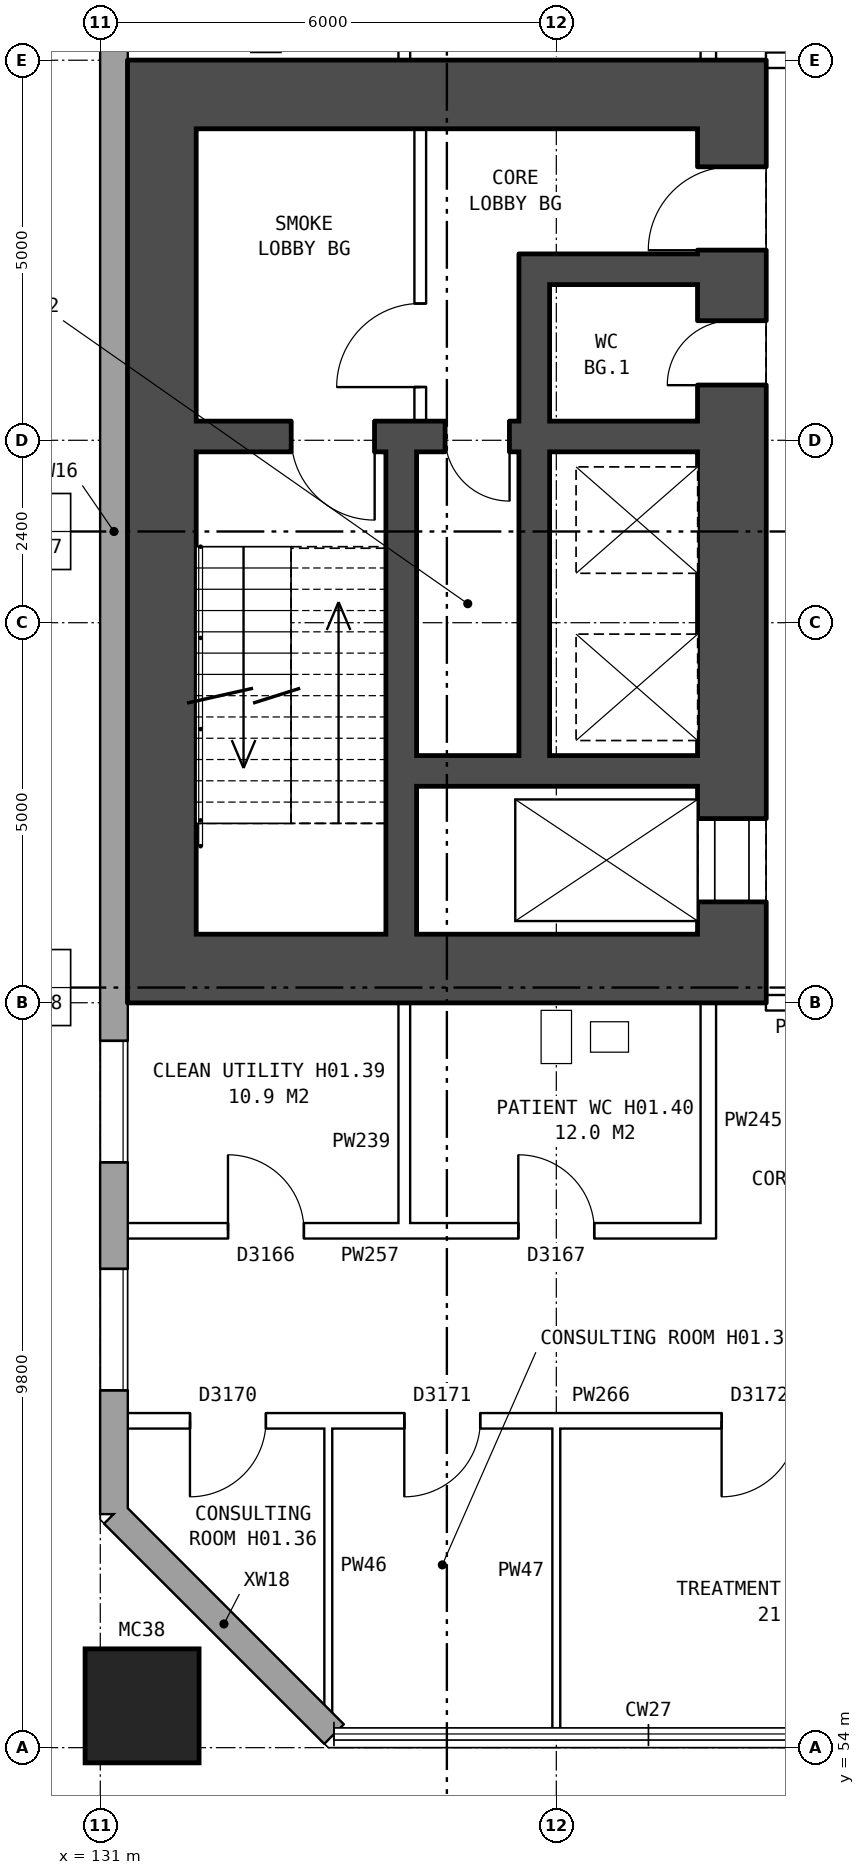
"""IFC4 building model, lengths in metres.
Left out: names, types, materials, properties, quantities, classifications, styles, units other than length and angle.
Written with IfcOpenShell. Run it as: python <this file> out.ifc"""

import sys

from ifc_helpers import new_model, si_unit, direction, frame, frame_2d, origin, origin_2d, place, context, subcontext, project, spatial, rectangle, hollow_rectangle, extrude, element, fill, save


model = new_model("IFC4")
c1 = context("Model", 3, precision=1e-05, world=origin(), true_north=direction((0.0, 1.0)))
c2 = subcontext(c1, "Body", "Model", "MODEL_VIEW")
j1 = project(units=[si_unit("LENGTHUNIT", "METRE"), si_unit("PLANEANGLEUNIT", "RADIAN")], contexts=[c1])
p1 = place(None, origin())
s1 = spatial("IfcSite", under=j1, at=p1, CompositionType="ELEMENT")
p2 = place(p1, origin())
s2 = spatial("IfcBuilding", under=s1, at=p2, CompositionType="ELEMENT")
p3 = place(p2, frame((0.0, 0.0, 5.5)))
s3 = spatial("IfcBuildingStorey", under=s2, at=p3, CompositionType="ELEMENT", Elevation=5.5)
p4 = place(p3, frame((131.55, 54.55, 0.0), z_axis=(0.0, 0.0, 1.0), x_axis=(1.0, 0.0, 0.0)))
e1 = element("IfcColumn", 1, at=p4, inside=s3, PredefinedType="COLUMN", context=c2, shape_type="SweptSolid", body=[
    extrude(hollow_rectangle(XDim=1.5, YDim=1.5, WallThickness=0.08, at=origin_2d()), origin(), (0.0, 0.0, 1.0), 4.6),
])
p5 = place(p3, frame((131.18, 57.075, 0.0), z_axis=(0.0, 0.0, 1.0), x_axis=(0.707106781187, -0.707106781187, 0.0)))
e2 = element("IfcWall", 2, at=p5, inside=s3, PredefinedType="STANDARD", context=c2, shape_type="SweptSolid", body=[
    extrude(rectangle(XDim=4.094, YDim=0.36, at=frame_2d((2.047, 0.0))), origin(), (0.0, 0.0, 1.0), 4.3),
])
p6 = place(p3, frame((131.18, 82.925, 0.0), z_axis=(0.0, 0.0, 1.0), x_axis=(0.0, -1.0, 0.0)))
e3 = element("IfcWall", 3, at=p6, inside=s3, PredefinedType="STANDARD", context=c2, shape_type="SweptSolid", body=[
    extrude(rectangle(XDim=25.851, YDim=0.36, at=frame_2d((12.925, 0.0))), origin(), (0.0, 0.0, 1.0), 4.3),
])
p7 = place(p6, frame((1.625, 0.0, 0.8)))
e4 = element("IfcOpeningElement", 4, at=p7, cuts=e3, PredefinedType="OPENING", context=c2, shape_type="SweptSolid", body=[
    extrude(rectangle(XDim=1.6, YDim=1.8, at=frame_2d((0.8, 0.9))), frame((0.0, 0.19, 0.0), z_axis=(0.0, -1.0, 0.0), x_axis=(1.0, 0.0, 0.0)), (0.0, 0.0, 1.0), 0.38),
])
p8 = place(p6, frame((4.625, 0.0, 0.8)))
e5 = element("IfcOpeningElement", 5, at=p8, cuts=e3, PredefinedType="OPENING", context=c2, shape_type="SweptSolid", body=[
    extrude(rectangle(XDim=1.6, YDim=1.8, at=frame_2d((0.8, 0.9))), frame((0.0, 0.19, 0.0), z_axis=(0.0, -1.0, 0.0), x_axis=(1.0, 0.0, 0.0)), (0.0, 0.0, 1.0), 0.38),
])
p9 = place(p6, frame((19.625, 0.0, 0.8)))
e6 = element("IfcOpeningElement", 6, at=p9, cuts=e3, PredefinedType="OPENING", context=c2, shape_type="SweptSolid", body=[
    extrude(rectangle(XDim=1.6, YDim=1.8, at=frame_2d((0.8, 0.9))), frame((0.0, 0.19, 0.0), z_axis=(0.0, -1.0, 0.0), x_axis=(1.0, 0.0, 0.0)), (0.0, 0.0, 1.0), 0.38),
])
p10 = place(p6, frame((22.625, 0.0, 0.8)))
e7 = element("IfcOpeningElement", 7, at=p10, cuts=e3, PredefinedType="OPENING", context=c2, shape_type="SweptSolid", body=[
    extrude(rectangle(XDim=1.6, YDim=1.8, at=frame_2d((0.8, 0.9))), frame((0.0, 0.19, 0.0), z_axis=(0.0, -1.0, 0.0), x_axis=(1.0, 0.0, 0.0)), (0.0, 0.0, 1.0), 0.38),
])
p11 = place(p3, frame((139.31, 64.7, 0.0), z_axis=(0.0, 0.0, 1.0), x_axis=(0.0, 1.0, 0.0)))
e8 = element("IfcWall", 8, at=p11, inside=s3, PredefinedType="SHEAR", context=c2, shape_type="SweptSolid", body=[
    extrude(rectangle(XDim=10.6, YDim=0.9, at=frame_2d((5.3, 0.0))), origin(), (0.0, 0.0, 1.0), 4.3),
])
p12 = place(p11, frame((0.425, 0.0, 0.0)))
e9 = element("IfcOpeningElement", 9, at=p12, cuts=e8, PredefinedType="OPENING", context=c2, shape_type="SweptSolid", body=[
    extrude(rectangle(XDim=1.1, YDim=2.1, at=frame_2d((0.55, 1.05))), frame((0.0, 0.46, 0.0), z_axis=(0.0, -1.0, 0.0), x_axis=(1.0, 0.0, 0.0)), (0.0, 0.0, 1.0), 0.92),
])
p13 = place(p11, frame((9.0, 0.0, 0.0)))
e10 = element("IfcOpeningElement", 10, at=p13, cuts=e8, PredefinedType="OPENING", context=c2, shape_type="SweptSolid", body=[
    extrude(rectangle(XDim=1.1, YDim=2.1, at=frame_2d((0.55, 1.05))), frame((0.0, 0.46, 0.0), z_axis=(0.0, -1.0, 0.0), x_axis=(1.0, 0.0, 0.0)), (0.0, 0.0, 1.0), 0.92),
])
p14 = place(p11, frame((7.225, 0.0, 0.0)))
e11 = element("IfcOpeningElement", 11, at=p14, cuts=e8, PredefinedType="OPENING", context=c2, shape_type="SweptSolid", body=[
    extrude(rectangle(XDim=0.85, YDim=2.1, at=frame_2d((0.425, 1.05))), frame((0.0, 0.46, 0.0), z_axis=(0.0, -1.0, 0.0), x_axis=(1.0, 0.0, 0.0)), (0.0, 0.0, 1.0), 0.92),
])
p15 = place(p3, frame((131.81, 64.7, 0.0), z_axis=(0.0, 0.0, 1.0), x_axis=(0.0, 1.0, 0.0)))
e12 = element("IfcWall", 12, at=p15, inside=s3, PredefinedType="SHEAR", context=c2, shape_type="SweptSolid", body=[
    extrude(rectangle(XDim=10.6, YDim=0.9, at=frame_2d((5.3, 0.0))), origin(), (0.0, 0.0, 1.0), 4.3),
])
for number, where, z_axis, x_axis in (
    (13, (139.76, 64.25, 0.0), (0.0, 0.0, 1.0), (-1.0, 0.0, 0.0)),
    (14, (139.76, 75.75, 0.0), (0.0, 0.0, 1.0), (-1.0, 0.0, 0.0)),
):
    element("IfcWall", number, at=place(p3, frame(where, z_axis=z_axis, x_axis=x_axis)), inside=s3, PredefinedType="SHEAR", context=c2, shape_type="SweptSolid", body=[
        extrude(rectangle(XDim=8.4, YDim=0.9, at=frame_2d((4.2, 0.0))), origin(), (0.0, 0.0, 1.0), 4.3),
    ])
p16 = place(p3, frame((138.86, 66.85, 0.0), z_axis=(0.0, 0.0, 1.0), x_axis=(-1.0, 0.0, 0.0)))
e15 = element("IfcWall", 15, at=p16, inside=s3, PredefinedType="SHEAR", context=c2, shape_type="SweptSolid", body=[
    extrude(rectangle(XDim=3.7, YDim=0.4, at=frame_2d((1.85, 0.0))), origin(), (0.0, 0.0, 1.0), 4.3),
])
p17 = place(p3, frame((138.86, 71.25, 0.0), z_axis=(0.0, 0.0, 1.0), x_axis=(-1.0, 0.0, 0.0)))
e16 = element("IfcWall", 16, at=p17, inside=s3, PredefinedType="SHEAR", context=c2, shape_type="SweptSolid", body=[
    extrude(rectangle(XDim=6.6, YDim=0.4, at=frame_2d((3.3, 0.0))), origin(), (0.0, 0.0, 1.0), 4.3),
])
p18 = place(p17, frame((4.25, 0.0, 0.0)))
e17 = element("IfcOpeningElement", 17, at=p18, cuts=e16, PredefinedType="OPENING", context=c2, shape_type="SweptSolid", body=[
    extrude(rectangle(XDim=1.1, YDim=2.1, at=frame_2d((0.55, 1.05))), frame((0.0, 0.21, 0.0), z_axis=(0.0, -1.0, 0.0), x_axis=(1.0, 0.0, 0.0)), (0.0, 0.0, 1.0), 0.42),
])
p19 = place(p17, frame((2.475, 0.0, 0.0)))
e18 = element("IfcOpeningElement", 18, at=p19, cuts=e16, PredefinedType="OPENING", context=c2, shape_type="SweptSolid", body=[
    extrude(rectangle(XDim=0.85, YDim=2.1, at=frame_2d((0.425, 1.05))), frame((0.0, 0.21, 0.0), z_axis=(0.0, -1.0, 0.0), x_axis=(1.0, 0.0, 0.0)), (0.0, 0.0, 1.0), 0.42),
])
p20 = place(p3, frame((138.86, 73.45, 0.0), z_axis=(0.0, 0.0, 1.0), x_axis=(-1.0, 0.0, 0.0)))
e19 = element("IfcWall", 19, at=p20, inside=s3, PredefinedType="SHEAR", context=c2, shape_type="SweptSolid", body=[
    extrude(rectangle(XDim=1.95, YDim=0.4, at=frame_2d((0.975, 0.0))), origin(), (0.0, 0.0, 1.0), 4.3),
])
p21 = place(p3, frame((136.71, 67.05, 0.0), z_axis=(0.0, 0.0, 1.0), x_axis=(0.0, 1.0, 0.0)))
e20 = element("IfcWall", 20, at=p21, inside=s3, PredefinedType="SHEAR", context=c2, shape_type="SweptSolid", body=[
    extrude(rectangle(XDim=4.0, YDim=0.4, at=frame_2d((2.0, 0.0))), origin(), (0.0, 0.0, 1.0), 4.3),
])
p22 = place(p3, frame((136.71, 71.45, 0.0), z_axis=(0.0, 0.0, 1.0), x_axis=(0.0, 1.0, 0.0)))
e21 = element("IfcWall", 21, at=p22, inside=s3, PredefinedType="SHEAR", context=c2, shape_type="SweptSolid", body=[
    extrude(rectangle(XDim=2.2, YDim=0.4, at=frame_2d((1.1, 0.0))), origin(), (0.0, 0.0, 1.0), 4.3),
])
p23 = place(p3, frame((135.21, 71.45, 0.0), z_axis=(0.0, 0.0, 1.0), x_axis=(0.0, 1.0, 0.0)))
e22 = element("IfcWall", 22, at=p23, inside=s3, PredefinedType="PARTITIONING", context=c2, shape_type="SweptSolid", body=[
    extrude(rectangle(XDim=3.85, YDim=0.15, at=frame_2d((1.925, 0.0))), origin(), (0.0, 0.0, 1.0), 4.3),
])
p24 = place(p23, frame((0.45, 0.0, 0.0)))
e23 = element("IfcOpeningElement", 23, at=p24, cuts=e22, PredefinedType="OPENING", context=c2, shape_type="SweptSolid", body=[
    extrude(rectangle(XDim=1.1, YDim=2.1, at=frame_2d((0.55, 1.05))), frame((0.0, 0.085, 0.0), z_axis=(0.0, -1.0, 0.0), x_axis=(1.0, 0.0, 0.0)), (0.0, 0.0, 1.0), 0.17),
])
p25 = place(p3, frame((134.96, 64.7, 0.0), z_axis=(0.0, 0.0, 1.0), x_axis=(0.0, 1.0, 0.0)))
e24 = element("IfcWall", 24, at=p25, inside=s3, PredefinedType="SHEAR", context=c2, shape_type="SweptSolid", body=[
    extrude(rectangle(XDim=6.35, YDim=0.4, at=frame_2d((3.175, 0.0))), origin(), (0.0, 0.0, 1.0), 4.3),
])
p26 = place(p3, frame((131.24, 58.3, 0.0), z_axis=(0.0, 0.0, 1.0), x_axis=(1.0, 0.0, 0.0)))
e25 = element("IfcWall", 25, at=p26, inside=s3, PredefinedType="PARTITIONING", context=c2, shape_type="SweptSolid", body=[
    extrude(rectangle(XDim=11.23, YDim=0.2, at=frame_2d((5.615, 0.0))), origin(), (0.0, 0.0, 1.0), 4.3),
])
p27 = place(p26, frame((0.94, 0.0, 0.0)))
e26 = element("IfcOpeningElement", 26, at=p27, cuts=e25, PredefinedType="OPENING", context=c2, shape_type="SweptSolid", body=[
    extrude(rectangle(XDim=1.0, YDim=2.1, at=frame_2d((0.5, 1.05))), frame((0.0, 0.11, 0.0), z_axis=(0.0, -1.0, 0.0), x_axis=(1.0, 0.0, 0.0)), (0.0, 0.0, 1.0), 0.22),
])
p28 = place(p26, frame((3.76, 0.0, 0.0)))
e27 = element("IfcOpeningElement", 27, at=p28, cuts=e25, PredefinedType="OPENING", context=c2, shape_type="SweptSolid", body=[
    extrude(rectangle(XDim=1.0, YDim=2.1, at=frame_2d((0.5, 1.05))), frame((0.0, 0.11, 0.0), z_axis=(0.0, -1.0, 0.0), x_axis=(1.0, 0.0, 0.0)), (0.0, 0.0, 1.0), 0.22),
])
p29 = place(p26, frame((7.935, 0.0, 0.0)))
e28 = element("IfcOpeningElement", 28, at=p29, cuts=e25, PredefinedType="OPENING", context=c2, shape_type="SweptSolid", body=[
    extrude(rectangle(XDim=1.0, YDim=2.1, at=frame_2d((0.5, 1.05))), frame((0.0, 0.11, 0.0), z_axis=(0.0, -1.0, 0.0), x_axis=(1.0, 0.0, 0.0)), (0.0, 0.0, 1.0), 0.22),
])
p30 = place(p3, frame((131.24, 60.8, 0.0), z_axis=(0.0, 0.0, 1.0), x_axis=(1.0, 0.0, 0.0)))
e29 = element("IfcWall", 29, at=p30, inside=s3, PredefinedType="PARTITIONING", context=c2, shape_type="SweptSolid", body=[
    extrude(rectangle(XDim=7.86, YDim=0.2, at=frame_2d((3.93, 0.0))), origin(), (0.0, 0.0, 1.0), 4.3),
])
p31 = place(p30, frame((1.44, 0.0, 0.0)))
e30 = element("IfcOpeningElement", 30, at=p31, cuts=e29, PredefinedType="OPENING", context=c2, shape_type="SweptSolid", body=[
    extrude(rectangle(XDim=1.0, YDim=2.1, at=frame_2d((0.5, 1.05))), frame((0.0, 0.11, 0.0), z_axis=(0.0, -1.0, 0.0), x_axis=(1.0, 0.0, 0.0)), (0.0, 0.0, 1.0), 0.22),
])
p32 = place(p30, frame((5.26, 0.0, 0.0)))
e31 = element("IfcOpeningElement", 31, at=p32, cuts=e29, PredefinedType="OPENING", context=c2, shape_type="SweptSolid", body=[
    extrude(rectangle(XDim=1.0, YDim=2.1, at=frame_2d((0.5, 1.05))), frame((0.0, 0.11, 0.0), z_axis=(0.0, -1.0, 0.0), x_axis=(1.0, 0.0, 0.0)), (0.0, 0.0, 1.0), 0.22),
])
p33 = place(p3, frame((139.76, 63.8, 0.0), z_axis=(0.0, 0.0, 1.0), x_axis=(1.0, 0.0, 0.0)))
e32 = element("IfcWall", 32, at=p33, inside=s3, PredefinedType="PARTITIONING", context=c2, shape_type="SweptSolid", body=[
    extrude(rectangle(XDim=2.59, YDim=0.2, at=frame_2d((1.295, 0.0))), origin(), (0.0, 0.0, 1.0), 4.3),
])
p34 = place(p33, frame((1.0, 0.0, 0.0)))
e33 = element("IfcOpeningElement", 33, at=p34, cuts=e32, PredefinedType="OPENING", context=c2, shape_type="SweptSolid", body=[
    extrude(rectangle(XDim=1.0, YDim=2.1, at=frame_2d((0.5, 1.05))), frame((0.0, 0.11, 0.0), z_axis=(0.0, -1.0, 0.0), x_axis=(1.0, 0.0, 0.0)), (0.0, 0.0, 1.0), 0.22),
])
p35 = place(p3, frame((139.76, 76.2, 0.0), z_axis=(0.0, 0.0, 1.0), x_axis=(1.0, 0.0, 0.0)))
e34 = element("IfcWall", 34, at=p35, inside=s3, PredefinedType="PARTITIONING", context=c2, shape_type="SweptSolid", body=[
    extrude(rectangle(XDim=2.59, YDim=0.2, at=frame_2d((1.295, 0.0))), origin(), (0.0, 0.0, 1.0), 4.3),
])
p36 = place(p35, frame((1.0, 0.0, 0.0)))
e35 = element("IfcOpeningElement", 35, at=p36, cuts=e34, PredefinedType="OPENING", context=c2, shape_type="SweptSolid", body=[
    extrude(rectangle(XDim=1.0, YDim=2.1, at=frame_2d((0.5, 1.05))), frame((0.0, 0.11, 0.0), z_axis=(0.0, -1.0, 0.0), x_axis=(1.0, 0.0, 0.0)), (0.0, 0.0, 1.0), 0.22),
])
p37 = place(p3, frame((134.0, 54.389, 0.0), z_axis=(0.0, 0.0, 1.0), x_axis=(0.0, 1.0, 0.0)))
e36 = element("IfcWall", 36, at=p37, inside=s3, PredefinedType="PARTITIONING", context=c2, shape_type="SweptSolid", body=[
    extrude(rectangle(XDim=4.011, YDim=0.1, at=frame_2d((2.005, 0.0))), origin(), (0.0, 0.0, 1.0), 4.3),
])
for number, where, z_axis, x_axis in (
    (37, (135.0, 60.7, 0.0), (0.0, 0.0, 1.0), (0.0, 1.0, 0.0)),
    (38, (135.0, 76.2, 0.0), (0.0, 0.0, 1.0), (0.0, 1.0, 0.0)),
):
    element("IfcWall", number, at=place(p3, frame(where, z_axis=z_axis, x_axis=x_axis)), inside=s3, PredefinedType="PLUMBINGWALL", context=c2, shape_type="SweptSolid", body=[
        extrude(rectangle(XDim=3.1, YDim=0.15, at=frame_2d((1.55, 0.0))), origin(), (0.0, 0.0, 1.0), 4.3),
    ])
p38 = place(p3, frame((137.0, 54.24, 0.0), z_axis=(0.0, 0.0, 1.0), x_axis=(0.0, 1.0, 0.0)))
e39 = element("IfcWall", 39, at=p38, inside=s3, PredefinedType="PARTITIONING", context=c2, shape_type="SweptSolid", body=[
    extrude(rectangle(XDim=4.16, YDim=0.1, at=frame_2d((2.08, 0.0))), origin(), (0.0, 0.0, 1.0), 4.3),
])
for number, where, z_axis, x_axis in (
    (40, (139.0, 60.7, 0.0), (0.0, 0.0, 1.0), (0.0, 1.0, 0.0)),
    (41, (139.0, 76.2, 0.0), (0.0, 0.0, 1.0), (0.0, 1.0, 0.0)),
):
    element("IfcWall", number, at=place(p3, frame(where, z_axis=z_axis, x_axis=x_axis)), inside=s3, PredefinedType="PARTITIONING", context=c2, shape_type="SweptSolid", body=[
        extrude(rectangle(XDim=3.1, YDim=0.2, at=frame_2d((1.55, 0.0))), origin(), (0.0, 0.0, 1.0), 4.3),
    ])
p39 = place(p9, origin())
e42 = element("IfcWindow", 42, at=p39, inside=s3, PartitioningType="SINGLE_PANEL", PredefinedType="WINDOW", context=c2, shape_type="SweptSolid", body=[
    extrude(rectangle(XDim=1.6, YDim=1.8, at=frame_2d((0.8, 0.9))), frame((0.0, 0.15, 0.0), z_axis=(0.0, -1.0, 0.0), x_axis=(1.0, 0.0, 0.0)), (0.0, 0.0, 1.0), 0.06),
])
fill(e6, e42)
p40 = place(p10, origin())
e43 = element("IfcWindow", 43, at=p40, inside=s3, PartitioningType="SINGLE_PANEL", PredefinedType="WINDOW", context=c2, shape_type="SweptSolid", body=[
    extrude(rectangle(XDim=1.6, YDim=1.8, at=frame_2d((0.8, 0.9))), frame((0.0, 0.15, 0.0), z_axis=(0.0, -1.0, 0.0), x_axis=(1.0, 0.0, 0.0)), (0.0, 0.0, 1.0), 0.06),
])
fill(e7, e43)
p41 = place(p12, origin())
e44 = element("IfcDoor", 44, at=p41, inside=s3, OperationType="DOUBLE_DOOR_SLIDING", PredefinedType="DOOR", context=c2, shape_type="SweptSolid", body=[
    extrude(rectangle(XDim=1.1, YDim=2.1, at=frame_2d((0.55, 1.05))), frame((0.0, 0.435, 0.0), z_axis=(0.0, -1.0, 0.0), x_axis=(1.0, 0.0, 0.0)), (0.0, 0.0, 1.0), 0.05),
])
fill(e9, e44)
p42 = place(p13, origin())
e45 = element("IfcDoor", 45, at=p42, inside=s3, OperationType="SINGLE_SWING_LEFT", PredefinedType="DOOR", context=c2, shape_type="SweptSolid", body=[
    extrude(rectangle(XDim=1.1, YDim=2.1, at=frame_2d((0.55, 1.05))), frame((0.0, 0.435, 0.0), z_axis=(0.0, -1.0, 0.0), x_axis=(1.0, 0.0, 0.0)), (0.0, 0.0, 1.0), 0.05),
])
fill(e10, e45)
p43 = place(p24, origin())
e46 = element("IfcDoor", 46, at=p43, inside=s3, OperationType="SINGLE_SWING_LEFT", PredefinedType="DOOR", context=c2, shape_type="SweptSolid", body=[
    extrude(rectangle(XDim=1.1, YDim=2.1, at=frame_2d((0.55, 1.05))), frame((0.0, 0.025, 0.0), z_axis=(0.0, -1.0, 0.0), x_axis=(1.0, 0.0, 0.0)), (0.0, 0.0, 1.0), 0.05),
])
fill(e23, e46)
p44 = place(p18, origin())
e47 = element("IfcDoor", 47, at=p44, inside=s3, OperationType="SINGLE_SWING_LEFT", PredefinedType="DOOR", context=c2, shape_type="SweptSolid", body=[
    extrude(rectangle(XDim=1.1, YDim=2.1, at=frame_2d((0.55, 1.05))), frame((0.0, 0.025, 0.0), z_axis=(0.0, -1.0, 0.0), x_axis=(1.0, 0.0, 0.0)), (0.0, 0.0, 1.0), 0.05),
])
fill(e17, e47)
p45 = place(p14, origin())
e48 = element("IfcDoor", 48, at=p45, inside=s3, OperationType="SINGLE_SWING_LEFT", PredefinedType="DOOR", context=c2, shape_type="SweptSolid", body=[
    extrude(rectangle(XDim=0.85, YDim=2.1, at=frame_2d((0.425, 1.05))), frame((0.0, 0.435, 0.0), z_axis=(0.0, -1.0, 0.0), x_axis=(1.0, 0.0, 0.0)), (0.0, 0.0, 1.0), 0.05),
])
fill(e11, e48)
p46 = place(p19, origin())
e49 = element("IfcDoor", 49, at=p46, inside=s3, OperationType="SINGLE_SWING_LEFT", PredefinedType="DOOR", context=c2, shape_type="SweptSolid", body=[
    extrude(rectangle(XDim=0.85, YDim=2.1, at=frame_2d((0.425, 1.05))), frame((0.0, 0.025, 0.0), z_axis=(0.0, -1.0, 0.0), x_axis=(1.0, 0.0, 0.0)), (0.0, 0.0, 1.0), 0.05),
])
fill(e18, e49)
p47 = place(p27, frame((1.0, 0.0, 0.0), z_axis=(0.0, 0.0, 1.0), x_axis=(-1.0, 0.0, 0.0)))
e50 = element("IfcDoor", 50, at=p47, inside=s3, OperationType="SINGLE_SWING_RIGHT", PredefinedType="DOOR", context=c2, shape_type="SweptSolid", body=[
    extrude(rectangle(XDim=1.0, YDim=2.1, at=frame_2d((0.5, 1.05))), frame((0.0, 0.025, 0.0), z_axis=(0.0, -1.0, 0.0), x_axis=(1.0, 0.0, 0.0)), (0.0, 0.0, 1.0), 0.05),
])
fill(e26, e50)
p48 = place(p28, frame((1.0, 0.0, 0.0), z_axis=(0.0, 0.0, 1.0), x_axis=(-1.0, 0.0, 0.0)))
e51 = element("IfcDoor", 51, at=p48, inside=s3, OperationType="SINGLE_SWING_RIGHT", PredefinedType="DOOR", context=c2, shape_type="SweptSolid", body=[
    extrude(rectangle(XDim=1.0, YDim=2.1, at=frame_2d((0.5, 1.05))), frame((0.0, 0.025, 0.0), z_axis=(0.0, -1.0, 0.0), x_axis=(1.0, 0.0, 0.0)), (0.0, 0.0, 1.0), 0.05),
])
fill(e27, e51)
p49 = place(p29, frame((1.0, 0.0, 0.0), z_axis=(0.0, 0.0, 1.0), x_axis=(-1.0, 0.0, 0.0)))
e52 = element("IfcDoor", 52, at=p49, inside=s3, OperationType="SINGLE_SWING_RIGHT", PredefinedType="DOOR", context=c2, shape_type="SweptSolid", body=[
    extrude(rectangle(XDim=1.0, YDim=2.1, at=frame_2d((0.5, 1.05))), frame((0.0, 0.025, 0.0), z_axis=(0.0, -1.0, 0.0), x_axis=(1.0, 0.0, 0.0)), (0.0, 0.0, 1.0), 0.05),
])
fill(e28, e52)
p50 = place(p31, origin())
e53 = element("IfcDoor", 53, at=p50, inside=s3, OperationType="SINGLE_SWING_LEFT", PredefinedType="DOOR", context=c2, shape_type="SweptSolid", body=[
    extrude(rectangle(XDim=1.0, YDim=2.1, at=frame_2d((0.5, 1.05))), frame((0.0, 0.025, 0.0), z_axis=(0.0, -1.0, 0.0), x_axis=(1.0, 0.0, 0.0)), (0.0, 0.0, 1.0), 0.05),
])
fill(e30, e53)
p51 = place(p32, origin())
e54 = element("IfcDoor", 54, at=p51, inside=s3, OperationType="SINGLE_SWING_LEFT", PredefinedType="DOOR", context=c2, shape_type="SweptSolid", body=[
    extrude(rectangle(XDim=1.0, YDim=2.1, at=frame_2d((0.5, 1.05))), frame((0.0, 0.025, 0.0), z_axis=(0.0, -1.0, 0.0), x_axis=(1.0, 0.0, 0.0)), (0.0, 0.0, 1.0), 0.05),
])
fill(e31, e54)
save(model, sys.argv[1])
